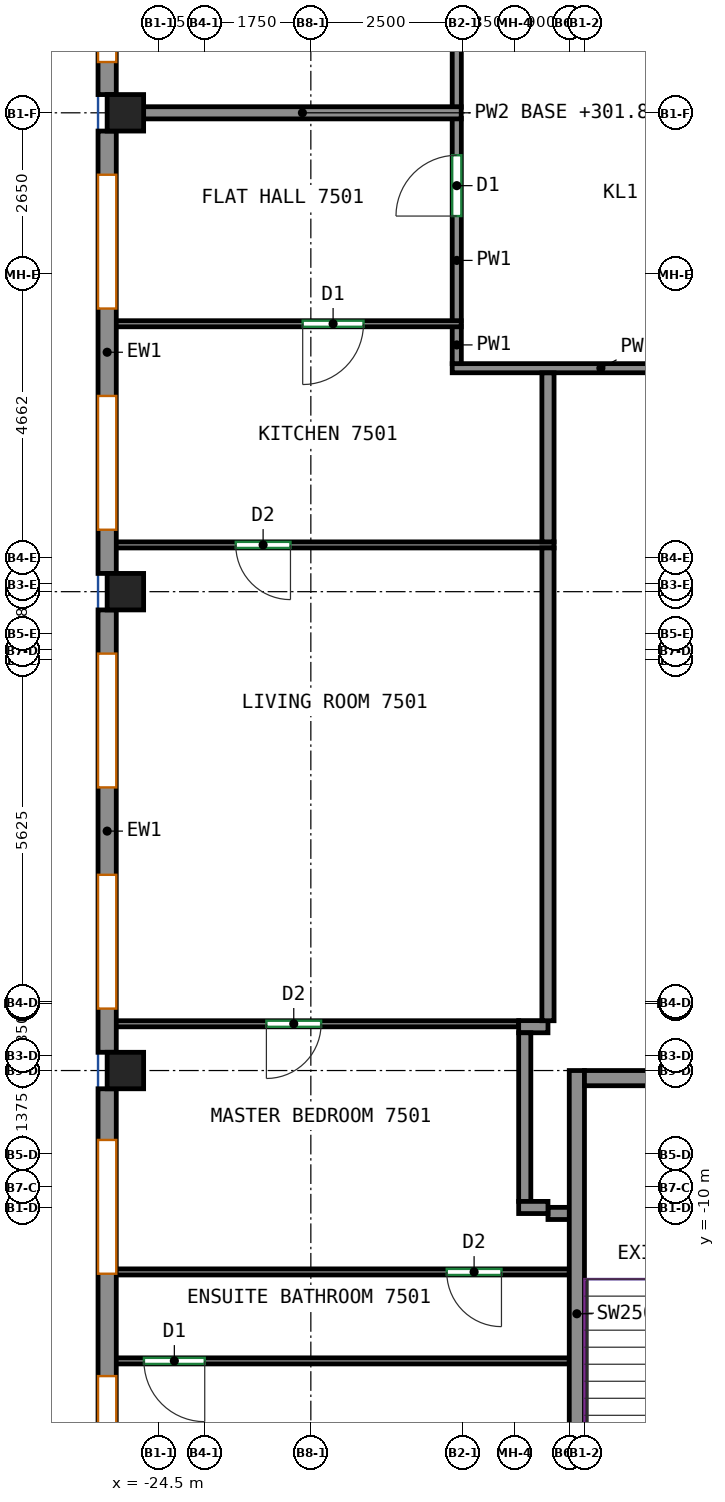
"""IFC4 building model, lengths in metres.
Left out: names, types, materials, properties, quantities, classifications, styles, units other than length and angle.
Written with IfcOpenShell. Run it as: python <this file> out.ifc"""

import sys

from ifc_helpers import new_model, si_unit, direction, frame, frame_2d, origin, origin_2d, place, context, subcontext, project, spatial, rectangle, extrude, source, transform, mapped, element, fill, save


model = new_model("IFC4")
c1 = context("Model", 3, precision=1e-05, world=origin(), true_north=direction((0.0, 1.0)))
c2 = subcontext(c1, "Body", "Model", "MODEL_VIEW")
j1 = project(units=[si_unit("LENGTHUNIT", "METRE"), si_unit("PLANEANGLEUNIT", "RADIAN")], contexts=[c1])
p1 = place(None, origin())
s1 = spatial("IfcSite", under=j1, at=p1, CompositionType="ELEMENT")
p2 = place(p1, origin())
s2 = spatial("IfcBuilding", under=s1, at=p2, CompositionType="ELEMENT")
p3 = place(p2, frame((0.0, 0.0, 301.8)))
s3 = spatial("IfcBuildingStorey", under=s2, at=p3, CompositionType="ELEMENT", Elevation=301.8)
m1 = source(origin(), c2, "Body", "SweptSolid", [
    extrude(rectangle(XDim=0.6, YDim=0.6, at=origin_2d()), origin(), (0.0, 0.0, 1.0), 3.12),
])
for number, where, z_axis, x_axis in (
    (1, (-25.05, -7.75, 0.0), (0.0, 0.0, 1.0), (1.0, 0.0, 0.0)),
    (2, (-25.05, 0.125, 0.0), (0.0, 0.0, 1.0), (1.0, 0.0, 0.0)),
    (3, (-25.05, 8.0, 0.0), (0.0, 0.0, 1.0), (1.0, 0.0, 0.0)),
):
    element("IfcColumn", number, at=place(p3, frame(where, z_axis=z_axis, x_axis=x_axis)), inside=s3, PredefinedType="COLUMN", context=c2, shape_type="MappedRepresentation", body=[
        mapped(m1, transform((0.0, 0.0, 0.0))),
    ])
m2 = source(origin(), c2, "Body", "SweptSolid", [
    extrude(rectangle(XDim=8.0, YDim=0.25, at=frame_2d((4.0, 0.0))), origin(), (0.0, 0.0, 1.0), 3.12),
])
p4 = place(p3, frame((-17.625, -15.75, 0.0), z_axis=(0.0, 0.0, 1.0), x_axis=(0.0, 1.0, 0.0)))
e4 = element("IfcWall", 4, at=p4, inside=s3, PredefinedType="SHEAR", context=c2, shape_type="MappedRepresentation", body=[
    mapped(m2, transform((0.0, 0.0, 0.0))),
])
m3 = source(origin(), c2, "Body", "SweptSolid", [
    extrude(rectangle(XDim=3.7, YDim=0.25, at=frame_2d((1.85, 0.0))), origin(), (0.0, 0.0, 1.0), 3.12),
])
p5 = place(p3, frame((-17.5, -7.875, 0.0), z_axis=(0.0, 0.0, 1.0), x_axis=(1.0, 0.0, 0.0)))
e5 = element("IfcWall", 5, at=p5, inside=s3, PredefinedType="SHEAR", context=c2, shape_type="MappedRepresentation", body=[
    mapped(m3, transform((0.0, 0.0, 0.0))),
])
m4 = source(origin(), c2, "Body", "SweptSolid", [
    extrude(rectangle(XDim=13.082, YDim=0.3, at=frame_2d((6.541, 0.0))), origin(), (0.0, 0.0, 1.0), 3.12),
])
p6 = place(p3, frame((-25.35, 21.382, 0.0), z_axis=(0.0, 0.0, 1.0), x_axis=(0.0, -1.0, 0.0)))
e6 = element("IfcWall", 6, at=p6, inside=s3, PredefinedType="SOLIDWALL", context=c2, shape_type="MappedRepresentation", body=[
    mapped(m4, transform((0.0, 0.0, 0.0))),
])
p7 = place(p6, frame((0.535, 0.0, 0.8)))
e7 = element("IfcOpeningElement", 7, at=p7, cuts=e6, PredefinedType="OPENING", context=c2, shape_type="SweptSolid", body=[
    extrude(rectangle(XDim=2.2, YDim=2.05, at=frame_2d((1.1, 1.025))), frame((0.0, 0.16, 0.0), z_axis=(0.0, -1.0, 0.0), x_axis=(1.0, 0.0, 0.0)), (0.0, 0.0, 1.0), 0.32),
])
p8 = place(p6, frame((3.806, 0.0, 0.8)))
e8 = element("IfcOpeningElement", 8, at=p8, cuts=e6, PredefinedType="OPENING", context=c2, shape_type="SweptSolid", body=[
    extrude(rectangle(XDim=2.2, YDim=2.05, at=frame_2d((1.1, 1.025))), frame((0.0, 0.16, 0.0), z_axis=(0.0, -1.0, 0.0), x_axis=(1.0, 0.0, 0.0)), (0.0, 0.0, 1.0), 0.32),
])
p9 = place(p6, frame((7.076, 0.0, 0.8)))
e9 = element("IfcOpeningElement", 9, at=p9, cuts=e6, PredefinedType="OPENING", context=c2, shape_type="SweptSolid", body=[
    extrude(rectangle(XDim=2.2, YDim=2.05, at=frame_2d((1.1, 1.025))), frame((0.0, 0.16, 0.0), z_axis=(0.0, -1.0, 0.0), x_axis=(1.0, 0.0, 0.0)), (0.0, 0.0, 1.0), 0.32),
])
p10 = place(p6, frame((10.347, 0.0, 0.8)))
e10 = element("IfcOpeningElement", 10, at=p10, cuts=e6, PredefinedType="OPENING", context=c2, shape_type="SweptSolid", body=[
    extrude(rectangle(XDim=2.2, YDim=2.05, at=frame_2d((1.1, 1.025))), frame((0.0, 0.16, 0.0), z_axis=(0.0, -1.0, 0.0), x_axis=(1.0, 0.0, 0.0)), (0.0, 0.0, 1.0), 0.32),
])
m5 = source(origin(), c2, "Body", "SweptSolid", [
    extrude(rectangle(XDim=7.275, YDim=0.3, at=frame_2d((3.637, 0.0))), origin(), (0.0, 0.0, 1.0), 3.12),
])
p11 = place(p3, frame((-25.35, 7.7, 0.0), z_axis=(0.0, 0.0, 1.0), x_axis=(0.0, -1.0, 0.0)))
e11 = element("IfcWall", 11, at=p11, inside=s3, PredefinedType="SOLIDWALL", context=c2, shape_type="MappedRepresentation", body=[
    mapped(m5, transform((0.0, 0.0, 0.0))),
])
p12 = place(p11, frame((0.719, 0.0, 0.8)))
e12 = element("IfcOpeningElement", 12, at=p12, cuts=e11, PredefinedType="OPENING", context=c2, shape_type="SweptSolid", body=[
    extrude(rectangle(XDim=2.2, YDim=2.05, at=frame_2d((1.1, 1.025))), frame((0.0, 0.16, 0.0), z_axis=(0.0, -1.0, 0.0), x_axis=(1.0, 0.0, 0.0)), (0.0, 0.0, 1.0), 0.32),
])
p13 = place(p11, frame((4.356, 0.0, 0.8)))
e13 = element("IfcOpeningElement", 13, at=p13, cuts=e11, PredefinedType="OPENING", context=c2, shape_type="SweptSolid", body=[
    extrude(rectangle(XDim=2.2, YDim=2.05, at=frame_2d((1.1, 1.025))), frame((0.0, 0.16, 0.0), z_axis=(0.0, -1.0, 0.0), x_axis=(1.0, 0.0, 0.0)), (0.0, 0.0, 1.0), 0.32),
])
p14 = place(p3, frame((-25.35, -0.175, 0.0), z_axis=(0.0, 0.0, 1.0), x_axis=(0.0, -1.0, 0.0)))
e14 = element("IfcWall", 14, at=p14, inside=s3, PredefinedType="SOLIDWALL", context=c2, shape_type="MappedRepresentation", body=[
    mapped(m5, transform((0.0, 0.0, 0.0))),
])
p15 = place(p14, frame((0.719, 0.0, 0.8)))
e15 = element("IfcOpeningElement", 15, at=p15, cuts=e14, PredefinedType="OPENING", context=c2, shape_type="SweptSolid", body=[
    extrude(rectangle(XDim=2.2, YDim=2.05, at=frame_2d((1.1, 1.025))), frame((0.0, 0.16, 0.0), z_axis=(0.0, -1.0, 0.0), x_axis=(1.0, 0.0, 0.0)), (0.0, 0.0, 1.0), 0.32),
])
p16 = place(p14, frame((4.356, 0.0, 0.8)))
e16 = element("IfcOpeningElement", 16, at=p16, cuts=e14, PredefinedType="OPENING", context=c2, shape_type="SweptSolid", body=[
    extrude(rectangle(XDim=2.2, YDim=2.05, at=frame_2d((1.1, 1.025))), frame((0.0, 0.16, 0.0), z_axis=(0.0, -1.0, 0.0), x_axis=(1.0, 0.0, 0.0)), (0.0, 0.0, 1.0), 0.32),
])
m6 = source(origin(), c2, "Body", "SweptSolid", [
    extrude(rectangle(XDim=11.65, YDim=0.3, at=frame_2d((5.825, 0.0))), origin(), (0.0, 0.0, 1.0), 3.12),
])
p17 = place(p3, frame((-25.35, -8.05, 0.0), z_axis=(0.0, 0.0, 1.0), x_axis=(0.0, -1.0, 0.0)))
e17 = element("IfcWall", 17, at=p17, inside=s3, PredefinedType="SOLIDWALL", context=c2, shape_type="MappedRepresentation", body=[
    mapped(m6, transform((0.0, 0.0, 0.0))),
])
p18 = place(p17, frame((0.842, 0.0, 0.8)))
e18 = element("IfcOpeningElement", 18, at=p18, cuts=e17, PredefinedType="OPENING", context=c2, shape_type="SweptSolid", body=[
    extrude(rectangle(XDim=2.2, YDim=2.05, at=frame_2d((1.1, 1.025))), frame((0.0, 0.16, 0.0), z_axis=(0.0, -1.0, 0.0), x_axis=(1.0, 0.0, 0.0)), (0.0, 0.0, 1.0), 0.32),
])
p19 = place(p17, frame((4.725, 0.0, 0.8)))
e19 = element("IfcOpeningElement", 19, at=p19, cuts=e17, PredefinedType="OPENING", context=c2, shape_type="SweptSolid", body=[
    extrude(rectangle(XDim=2.2, YDim=2.05, at=frame_2d((1.1, 1.025))), frame((0.0, 0.16, 0.0), z_axis=(0.0, -1.0, 0.0), x_axis=(1.0, 0.0, 0.0)), (0.0, 0.0, 1.0), 0.32),
])
p20 = place(p17, frame((8.617, 0.0, 0.8)))
e20 = element("IfcOpeningElement", 20, at=p20, cuts=e17, PredefinedType="OPENING", context=c2, shape_type="SweptSolid", body=[
    extrude(rectangle(XDim=0.8, YDim=2.05, at=frame_2d((0.4, 1.025))), frame((0.0, 0.16, 0.0), z_axis=(0.0, -1.0, 0.0), x_axis=(1.0, 0.0, 0.0)), (0.0, 0.0, 1.0), 0.32),
])
p21 = place(p17, frame((9.742, 0.0, 0.8)))
e21 = element("IfcOpeningElement", 21, at=p21, cuts=e17, PredefinedType="OPENING", context=c2, shape_type="SweptSolid", body=[
    extrude(rectangle(XDim=1.05, YDim=2.05, at=frame_2d((0.525, 1.025))), frame((0.0, 0.16, 0.0), z_axis=(0.0, -1.0, 0.0), x_axis=(1.0, 0.0, 0.0)), (0.0, 0.0, 1.0), 0.32),
])
p22 = place(p3, frame((-19.675, 3.8, 0.0), z_axis=(0.0, 0.0, 1.0), x_axis=(1.0, 0.0, 0.0)))
e22 = element("IfcWall", 22, at=p22, inside=s3, PredefinedType="PARTITIONING", context=c2, shape_type="SweptSolid", body=[
    extrude(rectangle(XDim=4.89, YDim=0.15, at=frame_2d((2.445, 0.0))), origin(), (0.0, 0.0, 1.0), 3.12),
])
p23 = place(p3, frame((-19.6, 3.875, 0.0), z_axis=(0.0, 0.0, 1.0), x_axis=(0.0, 1.0, 0.0)))
e23 = element("IfcWall", 23, at=p23, inside=s3, PredefinedType="PARTITIONING", context=c2, shape_type="SweptSolid", body=[
    extrude(rectangle(XDim=0.616, YDim=0.15, at=frame_2d((0.308, 0.0))), origin(), (0.0, 0.0, 1.0), 3.12),
])
p24 = place(p3, frame((-19.6, 4.571, 0.0), z_axis=(0.0, 0.0, 1.0), x_axis=(0.0, 1.0, 0.0)))
e24 = element("IfcWall", 24, at=p24, inside=s3, PredefinedType="PARTITIONING", context=c2, shape_type="SweptSolid", body=[
    extrude(rectangle(XDim=3.339, YDim=0.15, at=frame_2d((1.669, 0.0))), origin(), (0.0, 0.0, 1.0), 3.12),
])
p25 = place(p24, frame((1.731, 0.0, 0.0)))
e25 = element("IfcOpeningElement", 25, at=p25, cuts=e24, PredefinedType="OPENING", context=c2, shape_type="SweptSolid", body=[
    extrude(rectangle(XDim=1.0, YDim=2.1, at=frame_2d((0.5, 1.05))), frame((0.0, 0.085, 0.0), z_axis=(0.0, -1.0, 0.0), x_axis=(1.0, 0.0, 0.0)), (0.0, 0.0, 1.0), 0.17),
])
p26 = place(p3, frame((-19.6, 8.09, 0.0), z_axis=(0.0, 0.0, 1.0), x_axis=(0.0, 1.0, 0.0)))
e26 = element("IfcWall", 26, at=p26, inside=s3, PredefinedType="PARTITIONING", context=c2, shape_type="SweptSolid", body=[
    extrude(rectangle(XDim=15.635, YDim=0.15, at=frame_2d((7.817, 0.0))), origin(), (0.0, 0.0, 1.0), 3.12),
])
p27 = place(p3, frame((-17.75, -12.525, 0.0), z_axis=(0.0, 0.0, 1.0), x_axis=(-1.0, 0.0, 0.0)))
e27 = element("IfcWall", 27, at=p27, inside=s3, PredefinedType="PARTITIONING", context=c2, shape_type="SweptSolid", body=[
    extrude(rectangle(XDim=7.5, YDim=0.1, at=frame_2d((3.75, 0.0))), origin(), (0.0, 0.0, 1.0), 3.12),
])
p28 = place(p27, frame((5.995, 0.0, 0.0)))
e28 = element("IfcOpeningElement", 28, at=p28, cuts=e27, PredefinedType="OPENING", context=c2, shape_type="SweptSolid", body=[
    extrude(rectangle(XDim=1.0, YDim=2.1, at=frame_2d((0.5, 1.05))), frame((0.0, 0.06, 0.0), z_axis=(0.0, -1.0, 0.0), x_axis=(1.0, 0.0, 0.0)), (0.0, 0.0, 1.0), 0.12),
])
p29 = place(p3, frame((-17.75, -11.062, 0.0), z_axis=(0.0, 0.0, 1.0), x_axis=(-1.0, 0.0, 0.0)))
e29 = element("IfcWall", 29, at=p29, inside=s3, PredefinedType="PARTITIONING", context=c2, shape_type="SweptSolid", body=[
    extrude(rectangle(XDim=7.5, YDim=0.1, at=frame_2d((3.75, 0.0))), origin(), (0.0, 0.0, 1.0), 3.12),
])
p30 = place(p29, frame((1.115, 0.0, 0.0)))
e30 = element("IfcOpeningElement", 30, at=p30, cuts=e29, PredefinedType="OPENING", context=c2, shape_type="SweptSolid", body=[
    extrude(rectangle(XDim=0.9, YDim=2.1, at=frame_2d((0.45, 1.05))), frame((0.0, 0.06, 0.0), z_axis=(0.0, -1.0, 0.0), x_axis=(1.0, 0.0, 0.0)), (0.0, 0.0, 1.0), 0.12),
])
p31 = place(p3, frame((-18.582, -6.981, 0.0), z_axis=(0.0, 0.0, 1.0), x_axis=(-1.0, 0.0, 0.0)))
e31 = element("IfcWall", 31, at=p31, inside=s3, PredefinedType="PARTITIONING", context=c2, shape_type="SweptSolid", body=[
    extrude(rectangle(XDim=6.668, YDim=0.1, at=frame_2d((3.334, 0.0))), origin(), (0.0, 0.0, 1.0), 3.12),
])
p32 = place(p31, frame((3.249, 0.0, 0.0)))
e32 = element("IfcOpeningElement", 32, at=p32, cuts=e31, PredefinedType="OPENING", context=c2, shape_type="SweptSolid", body=[
    extrude(rectangle(XDim=0.9, YDim=2.1, at=frame_2d((0.45, 1.05))), frame((0.0, 0.06, 0.0), z_axis=(0.0, -1.0, 0.0), x_axis=(1.0, 0.0, 0.0)), (0.0, 0.0, 1.0), 0.12),
])
p33 = place(p3, frame((-17.7, -10.1, 0.0), z_axis=(0.0, 0.0, 1.0), x_axis=(-1.0, 0.0, 0.0)))
e33 = element("IfcWall", 33, at=p33, inside=s3, PredefinedType="PARTITIONING", context=c2, shape_type="SweptSolid", body=[
    extrude(rectangle(XDim=0.4, YDim=0.2, at=frame_2d((0.2, 0.0))), origin(), (0.0, 0.0, 1.0), 3.12),
])
p34 = place(p3, frame((-18.582, -7.029, 0.0), z_axis=(0.0, 0.0, 1.0), x_axis=(1.0, 0.0, 0.0)))
e34 = element("IfcWall", 34, at=p34, inside=s3, PredefinedType="PARTITIONING", context=c2, shape_type="SweptSolid", body=[
    extrude(rectangle(XDim=0.482, YDim=0.2, at=frame_2d((0.241, 0.0))), origin(), (0.0, 0.0, 1.0), 3.12),
])
p35 = place(p3, frame((-18.482, -9.902, 0.0), z_axis=(0.0, 0.0, 1.0), x_axis=(0.0, 1.0, 0.0)))
e35 = element("IfcWall", 35, at=p35, inside=s3, PredefinedType="PARTITIONING", context=c2, shape_type="SweptSolid", body=[
    extrude(rectangle(XDim=2.773, YDim=0.2, at=frame_2d((1.387, 0.0))), origin(), (0.0, 0.0, 1.0), 3.12),
])
p36 = place(p3, frame((-18.1, -10.002, 0.0), z_axis=(0.0, 0.0, 1.0), x_axis=(-1.0, 0.0, 0.0)))
e36 = element("IfcWall", 36, at=p36, inside=s3, PredefinedType="PARTITIONING", context=c2, shape_type="SweptSolid", body=[
    extrude(rectangle(XDim=0.482, YDim=0.2, at=frame_2d((0.241, 0.0))), origin(), (0.0, 0.0, 1.0), 3.12),
])
p37 = place(p3, frame((-18.0, 0.894, 0.0), z_axis=(0.0, 0.0, 1.0), x_axis=(-1.0, 0.0, 0.0)))
e37 = element("IfcWall", 37, at=p37, inside=s3, PredefinedType="PARTITIONING", context=c2, shape_type="SweptSolid", body=[
    extrude(rectangle(XDim=7.25, YDim=0.1, at=frame_2d((3.625, 0.0))), origin(), (0.0, 0.0, 1.0), 3.12),
])
p38 = place(p37, frame((4.335, 0.0, 0.0)))
e38 = element("IfcOpeningElement", 38, at=p38, cuts=e37, PredefinedType="OPENING", context=c2, shape_type="SweptSolid", body=[
    extrude(rectangle(XDim=0.9, YDim=2.1, at=frame_2d((0.45, 1.05))), frame((0.0, 0.06, 0.0), z_axis=(0.0, -1.0, 0.0), x_axis=(1.0, 0.0, 0.0)), (0.0, 0.0, 1.0), 0.12),
])
p39 = place(p3, frame((-18.1, -6.931, 0.0), z_axis=(0.0, 0.0, 1.0), x_axis=(0.0, 1.0, 0.0)))
e39 = element("IfcWall", 39, at=p39, inside=s3, PredefinedType="PARTITIONING", context=c2, shape_type="SweptSolid", body=[
    extrude(rectangle(XDim=7.775, YDim=0.2, at=frame_2d((3.887, 0.0))), origin(), (0.0, 0.0, 1.0), 3.12),
])
p40 = place(p3, frame((-19.527, 4.531, 0.0), z_axis=(0.0, 0.0, 1.0), x_axis=(-1.0, 0.0, 0.0)))
e40 = element("IfcWall", 40, at=p40, inside=s3, PredefinedType="PARTITIONING", context=c2, shape_type="SweptSolid", body=[
    extrude(rectangle(XDim=5.723, YDim=0.1, at=frame_2d((2.861, 0.0))), origin(), (0.0, 0.0, 1.0), 3.12),
])
p41 = place(p40, frame((1.607, 0.0, 0.0)))
e41 = element("IfcOpeningElement", 41, at=p41, cuts=e40, PredefinedType="OPENING", context=c2, shape_type="SweptSolid", body=[
    extrude(rectangle(XDim=1.0, YDim=2.1, at=frame_2d((0.5, 1.05))), frame((0.0, 0.06, 0.0), z_axis=(0.0, -1.0, 0.0), x_axis=(1.0, 0.0, 0.0)), (0.0, 0.0, 1.0), 0.12),
])
p42 = place(p3, frame((-18.1, 0.944, 0.0), z_axis=(0.0, 0.0, 1.0), x_axis=(0.0, 1.0, 0.0)))
e42 = element("IfcWall", 42, at=p42, inside=s3, PredefinedType="PARTITIONING", context=c2, shape_type="SweptSolid", body=[
    extrude(rectangle(XDim=2.779, YDim=0.2, at=frame_2d((1.389, 0.0))), origin(), (0.0, 0.0, 1.0), 3.12),
])
p43 = place(p3, frame((-19.527, 8.0, 0.0), z_axis=(0.0, 0.0, 1.0), x_axis=(-1.0, 0.0, 0.0)))
e43 = element("IfcWall", 43, at=p43, inside=s3, PredefinedType="PARTITIONING", context=c2, shape_type="SweptSolid", body=[
    extrude(rectangle(XDim=5.223, YDim=0.2, at=frame_2d((2.611, 0.0))), origin(), (0.0, 0.0, 1.0), 2.57),
])
p44 = place(p10, origin())
e44 = element("IfcWindow", 44, at=p44, inside=s3, PartitioningType="SINGLE_PANEL", PredefinedType="WINDOW", context=c2, shape_type="SweptSolid", body=[
    extrude(rectangle(XDim=2.2, YDim=2.05, at=frame_2d((1.1, 1.025))), frame((0.0, 0.03, 0.0), z_axis=(0.0, -1.0, 0.0), x_axis=(1.0, 0.0, 0.0)), (0.0, 0.0, 1.0), 0.06),
])
fill(e10, e44)
p45 = place(p12, origin())
e45 = element("IfcWindow", 45, at=p45, inside=s3, PartitioningType="SINGLE_PANEL", PredefinedType="WINDOW", context=c2, shape_type="SweptSolid", body=[
    extrude(rectangle(XDim=2.2, YDim=2.05, at=frame_2d((1.1, 1.025))), frame((0.0, 0.03, 0.0), z_axis=(0.0, -1.0, 0.0), x_axis=(1.0, 0.0, 0.0)), (0.0, 0.0, 1.0), 0.06),
])
fill(e12, e45)
p46 = place(p13, origin())
e46 = element("IfcWindow", 46, at=p46, inside=s3, PartitioningType="SINGLE_PANEL", PredefinedType="WINDOW", context=c2, shape_type="SweptSolid", body=[
    extrude(rectangle(XDim=2.2, YDim=2.05, at=frame_2d((1.1, 1.025))), frame((0.0, 0.03, 0.0), z_axis=(0.0, -1.0, 0.0), x_axis=(1.0, 0.0, 0.0)), (0.0, 0.0, 1.0), 0.06),
])
fill(e13, e46)
p47 = place(p15, origin())
e47 = element("IfcWindow", 47, at=p47, inside=s3, PartitioningType="SINGLE_PANEL", PredefinedType="WINDOW", context=c2, shape_type="SweptSolid", body=[
    extrude(rectangle(XDim=2.2, YDim=2.05, at=frame_2d((1.1, 1.025))), frame((0.0, 0.03, 0.0), z_axis=(0.0, -1.0, 0.0), x_axis=(1.0, 0.0, 0.0)), (0.0, 0.0, 1.0), 0.06),
])
fill(e15, e47)
p48 = place(p16, origin())
e48 = element("IfcWindow", 48, at=p48, inside=s3, PartitioningType="SINGLE_PANEL", PredefinedType="WINDOW", context=c2, shape_type="SweptSolid", body=[
    extrude(rectangle(XDim=2.2, YDim=2.05, at=frame_2d((1.1, 1.025))), frame((0.0, 0.03, 0.0), z_axis=(0.0, -1.0, 0.0), x_axis=(1.0, 0.0, 0.0)), (0.0, 0.0, 1.0), 0.06),
])
fill(e16, e48)
p49 = place(p18, origin())
e49 = element("IfcWindow", 49, at=p49, inside=s3, PartitioningType="SINGLE_PANEL", PredefinedType="WINDOW", context=c2, shape_type="SweptSolid", body=[
    extrude(rectangle(XDim=2.2, YDim=2.05, at=frame_2d((1.1, 1.025))), frame((0.0, 0.03, 0.0), z_axis=(0.0, -1.0, 0.0), x_axis=(1.0, 0.0, 0.0)), (0.0, 0.0, 1.0), 0.06),
])
fill(e18, e49)
p50 = place(p19, origin())
e50 = element("IfcWindow", 50, at=p50, inside=s3, PartitioningType="SINGLE_PANEL", PredefinedType="WINDOW", context=c2, shape_type="SweptSolid", body=[
    extrude(rectangle(XDim=2.2, YDim=2.05, at=frame_2d((1.1, 1.025))), frame((0.0, 0.03, 0.0), z_axis=(0.0, -1.0, 0.0), x_axis=(1.0, 0.0, 0.0)), (0.0, 0.0, 1.0), 0.06),
])
fill(e19, e50)
p51 = place(p28, origin())
e51 = element("IfcDoor", 51, at=p51, inside=s3, OperationType="SINGLE_SWING_LEFT", PredefinedType="DOOR", context=c2, shape_type="SweptSolid", body=[
    extrude(rectangle(XDim=1.0, YDim=2.1, at=frame_2d((0.5, 1.05))), frame((0.0, 0.025, 0.0), z_axis=(0.0, -1.0, 0.0), x_axis=(1.0, 0.0, 0.0)), (0.0, 0.0, 1.0), 0.05),
])
fill(e28, e51)
p52 = place(p30, origin())
e52 = element("IfcDoor", 52, at=p52, inside=s3, OperationType="SINGLE_SWING_LEFT", PredefinedType="DOOR", context=c2, shape_type="SweptSolid", body=[
    extrude(rectangle(XDim=0.9, YDim=2.1, at=frame_2d((0.45, 1.05))), frame((0.0, 0.025, 0.0), z_axis=(0.0, -1.0, 0.0), x_axis=(1.0, 0.0, 0.0)), (0.0, 0.0, 1.0), 0.05),
])
fill(e30, e52)
p53 = place(p32, origin())
e53 = element("IfcDoor", 53, at=p53, inside=s3, OperationType="SINGLE_SWING_RIGHT", PredefinedType="DOOR", context=c2, shape_type="SweptSolid", body=[
    extrude(rectangle(XDim=0.9, YDim=2.1, at=frame_2d((0.45, 1.05))), frame((0.0, 0.025, 0.0), z_axis=(0.0, -1.0, 0.0), x_axis=(1.0, 0.0, 0.0)), (0.0, 0.0, 1.0), 0.05),
])
fill(e32, e53)
p54 = place(p38, origin())
e54 = element("IfcDoor", 54, at=p54, inside=s3, OperationType="SINGLE_SWING_LEFT", PredefinedType="DOOR", context=c2, shape_type="SweptSolid", body=[
    extrude(rectangle(XDim=0.9, YDim=2.1, at=frame_2d((0.45, 1.05))), frame((0.0, 0.025, 0.0), z_axis=(0.0, -1.0, 0.0), x_axis=(1.0, 0.0, 0.0)), (0.0, 0.0, 1.0), 0.05),
])
fill(e38, e54)
p55 = place(p41, origin())
e55 = element("IfcDoor", 55, at=p55, inside=s3, OperationType="SINGLE_SWING_RIGHT", PredefinedType="DOOR", context=c2, shape_type="SweptSolid", body=[
    extrude(rectangle(XDim=1.0, YDim=2.1, at=frame_2d((0.5, 1.05))), frame((0.0, 0.025, 0.0), z_axis=(0.0, -1.0, 0.0), x_axis=(1.0, 0.0, 0.0)), (0.0, 0.0, 1.0), 0.05),
])
fill(e41, e55)
p56 = place(p25, origin())
e56 = element("IfcDoor", 56, at=p56, inside=s3, OperationType="SINGLE_SWING_LEFT", PredefinedType="DOOR", context=c2, shape_type="SweptSolid", body=[
    extrude(rectangle(XDim=1.0, YDim=2.1, at=frame_2d((0.5, 1.05))), frame((0.0, 0.025, 0.0), z_axis=(0.0, -1.0, 0.0), x_axis=(1.0, 0.0, 0.0)), (0.0, 0.0, 1.0), 0.05),
])
fill(e25, e56)
save(model, sys.argv[1])
